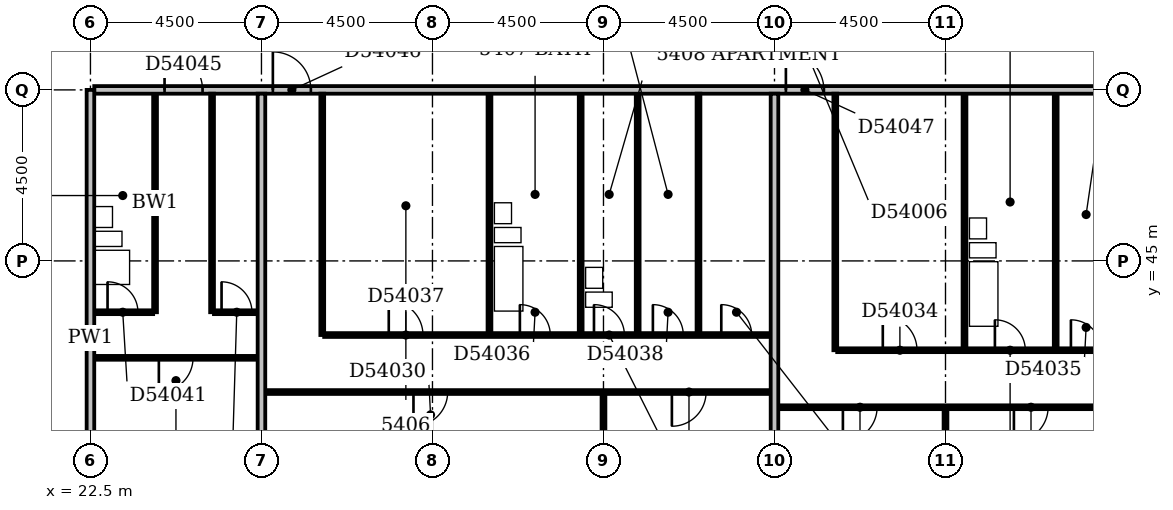
"""IFC4 building model, lengths in metres.
Left out: names, types, materials, properties, quantities, classifications, styles, units other than length and angle.
Written with IfcOpenShell. Run it as: python <this file> out.ifc"""

import sys

from ifc_helpers import new_model, si_unit, direction, frame, frame_2d, origin, place, context, subcontext, project, spatial, rectangle, extrude, element, fill, save


model = new_model("IFC4")
c1 = context("Model", 3, precision=1e-05, world=origin(), true_north=direction((0.0, 1.0)))
c2 = subcontext(c1, "Body", "Model", "MODEL_VIEW")
j1 = project(units=[si_unit("LENGTHUNIT", "METRE"), si_unit("PLANEANGLEUNIT", "RADIAN")], contexts=[c1])
p1 = place(None, origin())
s1 = spatial("IfcSite", under=j1, at=p1, CompositionType="ELEMENT")
p2 = place(p1, origin())
s2 = spatial("IfcBuilding", under=s1, at=p2, CompositionType="ELEMENT")
p3 = place(p2, frame((0.0, 0.0, 211.4)))
s3 = spatial("IfcBuildingStorey", under=s2, at=p3, CompositionType="ELEMENT", Elevation=211.4)
p4 = place(p3, frame((22.5, 36.45, 0.0), z_axis=(0.0, 0.0, 1.0), x_axis=(0.0, 1.0, 0.0)))
e1 = element("IfcWall", 1, at=p4, inside=s3, PredefinedType="PARTITIONING", context=c2, shape_type="SweptSolid", body=[
    extrude(rectangle(XDim=13.05, YDim=0.2, at=frame_2d((6.525, 0.0))), origin(), (0.0, 0.0, 1.0), 3.3),
])
p5 = place(p3, frame((27.0, 36.45, 0.0), z_axis=(0.0, 0.0, 1.0), x_axis=(0.0, 1.0, 0.0)))
e2 = element("IfcWall", 2, at=p5, inside=s3, PredefinedType="PARTITIONING", context=c2, shape_type="SweptSolid", body=[
    extrude(rectangle(XDim=12.95, YDim=0.2, at=frame_2d((6.475, 0.0))), origin(), (0.0, 0.0, 1.0), 2.4),
])
p6 = place(p3, frame((36.0, 36.45, 0.0), z_axis=(0.0, 0.0, 1.0), x_axis=(0.0, 1.0, 0.0)))
e3 = element("IfcWall", 3, at=p6, inside=s3, PredefinedType="PARTITIONING", context=c2, shape_type="SweptSolid", body=[
    extrude(rectangle(XDim=5.05, YDim=0.1, at=frame_2d((2.525, 0.0))), origin(), (0.0, 0.0, 1.0), 2.4),
])
p7 = place(p3, frame((40.5, 36.45, 0.0), z_axis=(0.0, 0.0, 1.0), x_axis=(0.0, 1.0, 0.0)))
e4 = element("IfcWall", 4, at=p7, inside=s3, PredefinedType="PARTITIONING", context=c2, shape_type="SweptSolid", body=[
    extrude(rectangle(XDim=12.95, YDim=0.2, at=frame_2d((6.475, 0.0))), origin(), (0.0, 0.0, 1.0), 3.3),
])
p8 = place(p3, frame((45.0, 36.45, 0.0), z_axis=(0.0, 0.0, 1.0), x_axis=(0.0, 1.0, 0.0)))
e5 = element("IfcWall", 5, at=p8, inside=s3, PredefinedType="PARTITIONING", context=c2, shape_type="SweptSolid", body=[
    extrude(rectangle(XDim=4.65, YDim=0.1, at=frame_2d((2.325, 0.0))), origin(), (0.0, 0.0, 1.0), 2.6),
])
p9 = place(p3, frame((40.6, 41.15, 0.0), z_axis=(0.0, 0.0, 1.0), x_axis=(1.0, 0.0, 0.0)))
e6 = element("IfcWall", 6, at=p9, inside=s3, PredefinedType="PARTITIONING", context=c2, shape_type="SweptSolid", body=[
    extrude(rectangle(XDim=8.8, YDim=0.1, at=frame_2d((4.4, 0.0))), origin(), (0.0, 0.0, 1.0), 3.3),
])
p10 = place(p9, frame((1.7, 0.0, 0.0)))
e7 = element("IfcOpeningElement", 7, at=p10, cuts=e6, PredefinedType="OPENING", context=c2, shape_type="SweptSolid", body=[
    extrude(rectangle(XDim=0.9, YDim=2.1, at=frame_2d((0.45, 1.05))), frame((0.0, 0.062, 0.0), z_axis=(0.0, -1.0, 0.0), x_axis=(1.0, 0.0, 0.0)), (0.0, 0.0, 1.0), 0.124),
])
p11 = place(p9, frame((6.2, 0.0, 0.0)))
e8 = element("IfcOpeningElement", 8, at=p11, cuts=e6, PredefinedType="OPENING", context=c2, shape_type="SweptSolid", body=[
    extrude(rectangle(XDim=0.9, YDim=2.1, at=frame_2d((0.45, 1.05))), frame((0.0, 0.062, 0.0), z_axis=(0.0, -1.0, 0.0), x_axis=(1.0, 0.0, 0.0)), (0.0, 0.0, 1.0), 0.124),
])
p12 = place(p3, frame((27.1, 41.55, 0.0), z_axis=(0.0, 0.0, 1.0), x_axis=(1.0, 0.0, 0.0)))
e9 = element("IfcWall", 9, at=p12, inside=s3, PredefinedType="PARTITIONING", context=c2, shape_type="SweptSolid", body=[
    extrude(rectangle(XDim=13.3, YDim=0.1, at=frame_2d((6.65, 0.0))), origin(), (0.0, 0.0, 1.0), 3.3),
])
p13 = place(p12, frame((3.9, 0.0, 0.0)))
e10 = element("IfcOpeningElement", 10, at=p13, cuts=e9, PredefinedType="OPENING", context=c2, shape_type="SweptSolid", body=[
    extrude(rectangle(XDim=0.9, YDim=2.1, at=frame_2d((0.45, 1.05))), frame((0.0, 0.062, 0.0), z_axis=(0.0, -1.0, 0.0), x_axis=(1.0, 0.0, 0.0)), (0.0, 0.0, 1.0), 0.124),
])
p14 = place(p12, frame((10.7, 0.0, 0.0)))
e11 = element("IfcOpeningElement", 11, at=p14, cuts=e9, PredefinedType="OPENING", context=c2, shape_type="SweptSolid", body=[
    extrude(rectangle(XDim=0.9, YDim=2.1, at=frame_2d((0.45, 1.05))), frame((0.0, 0.062, 0.0), z_axis=(0.0, -1.0, 0.0), x_axis=(1.0, 0.0, 0.0)), (0.0, 0.0, 1.0), 0.124),
])
p15 = place(p3, frame((22.6, 42.45, 0.0), z_axis=(0.0, 0.0, 1.0), x_axis=(1.0, 0.0, 0.0)))
e12 = element("IfcWall", 12, at=p15, inside=s3, PredefinedType="PARTITIONING", context=c2, shape_type="SweptSolid", body=[
    extrude(rectangle(XDim=4.3, YDim=0.1, at=frame_2d((2.15, 0.0))), origin(), (0.0, 0.0, 1.0), 3.3),
])
p16 = place(p15, frame((1.7, 0.0, 0.0)))
e13 = element("IfcOpeningElement", 13, at=p16, cuts=e12, PredefinedType="OPENING", context=c2, shape_type="SweptSolid", body=[
    extrude(rectangle(XDim=0.9, YDim=2.1, at=frame_2d((0.45, 1.05))), frame((0.0, 0.062, 0.0), z_axis=(0.0, -1.0, 0.0), x_axis=(1.0, 0.0, 0.0)), (0.0, 0.0, 1.0), 0.124),
])
p17 = place(p3, frame((42.1, 42.65, 0.0), z_axis=(0.0, 0.0, 1.0), x_axis=(0.0, 1.0, 0.0)))
e14 = element("IfcWall", 14, at=p17, inside=s3, PredefinedType="PARTITIONING", context=c2, shape_type="SweptSolid", body=[
    extrude(rectangle(XDim=6.75, YDim=0.1, at=frame_2d((3.375, 0.0))), origin(), (0.0, 0.0, 1.0), 3.3),
])
p18 = place(p3, frame((42.15, 42.65, 0.0), z_axis=(0.0, 0.0, 1.0), x_axis=(1.0, 0.0, 0.0)))
e15 = element("IfcWall", 15, at=p18, inside=s3, PredefinedType="PARTITIONING", context=c2, shape_type="SweptSolid", body=[
    extrude(rectangle(XDim=7.25, YDim=0.1, at=frame_2d((3.625, 0.0))), origin(), (0.0, 0.0, 1.0), 3.3),
])
p19 = place(p18, frame((4.15, 0.0, 0.0)))
e16 = element("IfcOpeningElement", 16, at=p19, cuts=e15, PredefinedType="OPENING", context=c2, shape_type="SweptSolid", body=[
    extrude(rectangle(XDim=0.8, YDim=2.1, at=frame_2d((0.4, 1.05))), frame((0.0, 0.062, 0.0), z_axis=(0.0, -1.0, 0.0), x_axis=(1.0, 0.0, 0.0)), (0.0, 0.0, 1.0), 0.124),
])
p20 = place(p18, frame((1.2, 0.0, 0.0)))
e17 = element("IfcOpeningElement", 17, at=p20, cuts=e15, PredefinedType="OPENING", context=c2, shape_type="SweptSolid", body=[
    extrude(rectangle(XDim=0.9, YDim=2.1, at=frame_2d((0.45, 1.05))), frame((0.0, 0.062, 0.0), z_axis=(0.0, -1.0, 0.0), x_axis=(1.0, 0.0, 0.0)), (0.0, 0.0, 1.0), 0.124),
])
p21 = place(p18, frame((6.15, 0.0, 0.0)))
e18 = element("IfcOpeningElement", 18, at=p21, cuts=e15, PredefinedType="OPENING", context=c2, shape_type="SweptSolid", body=[
    extrude(rectangle(XDim=0.8, YDim=2.1, at=frame_2d((0.4, 1.05))), frame((0.0, 0.062, 0.0), z_axis=(0.0, -1.0, 0.0), x_axis=(1.0, 0.0, 0.0)), (0.0, 0.0, 1.0), 0.124),
])
p22 = place(p3, frame((45.5, 42.7, 0.0), z_axis=(0.0, 0.0, 1.0), x_axis=(0.0, 1.0, 0.0)))
e19 = element("IfcWall", 19, at=p22, inside=s3, PredefinedType="PLUMBINGWALL", context=c2, shape_type="SweptSolid", body=[
    extrude(rectangle(XDim=6.7, YDim=0.1, at=frame_2d((3.35, 0.0))), origin(), (0.0, 0.0, 1.0), 2.6),
])
p23 = place(p3, frame((47.9, 42.7, 0.0), z_axis=(0.0, 0.0, 1.0), x_axis=(0.0, 1.0, 0.0)))
e20 = element("IfcWall", 20, at=p23, inside=s3, PredefinedType="PLUMBINGWALL", context=c2, shape_type="SweptSolid", body=[
    extrude(rectangle(XDim=6.7, YDim=0.1, at=frame_2d((3.35, 0.0))), origin(), (0.0, 0.0, 1.0), 3.3),
])
p24 = place(p3, frame((28.6, 43.05, 0.0), z_axis=(0.0, 0.0, 1.0), x_axis=(0.0, 1.0, 0.0)))
e21 = element("IfcWall", 21, at=p24, inside=s3, PredefinedType="PARTITIONING", context=c2, shape_type="SweptSolid", body=[
    extrude(rectangle(XDim=6.35, YDim=0.1, at=frame_2d((3.175, 0.0))), origin(), (0.0, 0.0, 1.0), 3.3),
])
p25 = place(p3, frame((28.65, 43.05, 0.0), z_axis=(0.0, 0.0, 1.0), x_axis=(1.0, 0.0, 0.0)))
e22 = element("IfcWall", 22, at=p25, inside=s3, PredefinedType="PARTITIONING", context=c2, shape_type="SweptSolid", body=[
    extrude(rectangle(XDim=11.75, YDim=0.1, at=frame_2d((5.875, 0.0))), origin(), (0.0, 0.0, 1.0), 3.3),
])
p26 = place(p25, frame((5.15, 0.0, 0.0)))
e23 = element("IfcOpeningElement", 23, at=p26, cuts=e22, PredefinedType="OPENING", context=c2, shape_type="SweptSolid", body=[
    extrude(rectangle(XDim=0.8, YDim=2.1, at=frame_2d((0.4, 1.05))), frame((0.0, 0.062, 0.0), z_axis=(0.0, -1.0, 0.0), x_axis=(1.0, 0.0, 0.0)), (0.0, 0.0, 1.0), 0.124),
])
p27 = place(p25, frame((1.7, 0.0, 0.0)))
e24 = element("IfcOpeningElement", 24, at=p27, cuts=e22, PredefinedType="OPENING", context=c2, shape_type="SweptSolid", body=[
    extrude(rectangle(XDim=0.9, YDim=2.1, at=frame_2d((0.45, 1.05))), frame((0.0, 0.062, 0.0), z_axis=(0.0, -1.0, 0.0), x_axis=(1.0, 0.0, 0.0)), (0.0, 0.0, 1.0), 0.124),
])
p28 = place(p25, frame((8.65, 0.0, 0.0)))
e25 = element("IfcOpeningElement", 25, at=p28, cuts=e22, PredefinedType="OPENING", context=c2, shape_type="SweptSolid", body=[
    extrude(rectangle(XDim=0.8, YDim=2.1, at=frame_2d((0.4, 1.05))), frame((0.0, 0.062, 0.0), z_axis=(0.0, -1.0, 0.0), x_axis=(1.0, 0.0, 0.0)), (0.0, 0.0, 1.0), 0.124),
])
p29 = place(p25, frame((10.45, 0.0, 0.0)))
e26 = element("IfcOpeningElement", 26, at=p29, cuts=e22, PredefinedType="OPENING", context=c2, shape_type="SweptSolid", body=[
    extrude(rectangle(XDim=0.8, YDim=2.1, at=frame_2d((0.4, 1.05))), frame((0.0, 0.062, 0.0), z_axis=(0.0, -1.0, 0.0), x_axis=(1.0, 0.0, 0.0)), (0.0, 0.0, 1.0), 0.124),
])
p30 = place(p25, frame((7.1, 0.0, 0.0)))
e27 = element("IfcOpeningElement", 27, at=p30, cuts=e22, PredefinedType="OPENING", context=c2, shape_type="SweptSolid", body=[
    extrude(rectangle(XDim=0.8, YDim=2.1, at=frame_2d((0.4, 1.05))), frame((0.0, 0.062, 0.0), z_axis=(0.0, -1.0, 0.0), x_axis=(1.0, 0.0, 0.0)), (0.0, 0.0, 1.0), 0.124),
])
p31 = place(p3, frame((33.0, 43.1, 0.0), z_axis=(0.0, 0.0, 1.0), x_axis=(0.0, 1.0, 0.0)))
e28 = element("IfcWall", 28, at=p31, inside=s3, PredefinedType="PLUMBINGWALL", context=c2, shape_type="SweptSolid", body=[
    extrude(rectangle(XDim=6.3, YDim=0.1, at=frame_2d((3.15, 0.0))), origin(), (0.0, 0.0, 1.0), 3.3),
])
p32 = place(p3, frame((35.4, 43.1, 0.0), z_axis=(0.0, 0.0, 1.0), x_axis=(0.0, 1.0, 0.0)))
e29 = element("IfcWall", 29, at=p32, inside=s3, PredefinedType="PLUMBINGWALL", context=c2, shape_type="SweptSolid", body=[
    extrude(rectangle(XDim=6.3, YDim=0.1, at=frame_2d((3.15, 0.0))), origin(), (0.0, 0.0, 1.0), 2.4),
])
p33 = place(p3, frame((36.9, 43.1, 0.0), z_axis=(0.0, 0.0, 1.0), x_axis=(0.0, 1.0, 0.0)))
e30 = element("IfcWall", 30, at=p33, inside=s3, PredefinedType="PLUMBINGWALL", context=c2, shape_type="SweptSolid", body=[
    extrude(rectangle(XDim=6.3, YDim=0.1, at=frame_2d((3.15, 0.0))), origin(), (0.0, 0.0, 1.0), 3.3),
])
p34 = place(p3, frame((38.5, 43.1, 0.0), z_axis=(0.0, 0.0, 1.0), x_axis=(0.0, 1.0, 0.0)))
e31 = element("IfcWall", 31, at=p34, inside=s3, PredefinedType="PARTITIONING", context=c2, shape_type="SweptSolid", body=[
    extrude(rectangle(XDim=6.3, YDim=0.1, at=frame_2d((3.15, 0.0))), origin(), (0.0, 0.0, 1.0), 3.3),
])
p35 = place(p3, frame((22.6, 43.65, 0.0), z_axis=(0.0, 0.0, 1.0), x_axis=(1.0, 0.0, 0.0)))
e32 = element("IfcWall", 32, at=p35, inside=s3, PredefinedType="PARTITIONING", context=c2, shape_type="SweptSolid", body=[
    extrude(rectangle(XDim=1.55, YDim=0.1, at=frame_2d((0.775, 0.0))), origin(), (0.0, 0.0, 1.0), 3.3),
])
p36 = place(p35, frame((0.35, 0.0, 0.0)))
e33 = element("IfcOpeningElement", 33, at=p36, cuts=e32, PredefinedType="OPENING", context=c2, shape_type="SweptSolid", body=[
    extrude(rectangle(XDim=0.8, YDim=2.1, at=frame_2d((0.4, 1.05))), frame((0.0, 0.062, 0.0), z_axis=(0.0, -1.0, 0.0), x_axis=(1.0, 0.0, 0.0)), (0.0, 0.0, 1.0), 0.124),
])
p37 = place(p3, frame((24.2, 43.65, 0.0), z_axis=(0.0, 0.0, 1.0), x_axis=(0.0, 1.0, 0.0)))
e34 = element("IfcWall", 34, at=p37, inside=s3, PredefinedType="PLUMBINGWALL", context=c2, shape_type="SweptSolid", body=[
    extrude(rectangle(XDim=5.75, YDim=0.1, at=frame_2d((2.875, 0.0))), origin(), (0.0, 0.0, 1.0), 3.3),
])
p38 = place(p3, frame((25.7, 43.65, 0.0), z_axis=(0.0, 0.0, 1.0), x_axis=(0.0, 1.0, 0.0)))
e35 = element("IfcWall", 35, at=p38, inside=s3, PredefinedType="PARTITIONING", context=c2, shape_type="SweptSolid", body=[
    extrude(rectangle(XDim=5.75, YDim=0.1, at=frame_2d((2.875, 0.0))), origin(), (0.0, 0.0, 1.0), 3.3),
])
p39 = place(p3, frame((25.75, 43.65, 0.0), z_axis=(0.0, 0.0, 1.0), x_axis=(1.0, 0.0, 0.0)))
e36 = element("IfcWall", 36, at=p39, inside=s3, PredefinedType="PARTITIONING", context=c2, shape_type="SweptSolid", body=[
    extrude(rectangle(XDim=1.15, YDim=0.1, at=frame_2d((0.575, 0.0))), origin(), (0.0, 0.0, 1.0), 3.3),
])
p40 = place(p39, frame((0.2, 0.0, 0.0)))
e37 = element("IfcOpeningElement", 37, at=p40, cuts=e36, PredefinedType="OPENING", context=c2, shape_type="SweptSolid", body=[
    extrude(rectangle(XDim=0.8, YDim=2.1, at=frame_2d((0.4, 1.05))), frame((0.0, 0.062, 0.0), z_axis=(0.0, -1.0, 0.0), x_axis=(1.0, 0.0, 0.0)), (0.0, 0.0, 1.0), 0.124),
])
p41 = place(p3, frame((22.6, 49.5, 0.0), z_axis=(0.0, 0.0, 1.0), x_axis=(1.0, 0.0, 0.0)))
e38 = element("IfcWall", 38, at=p41, inside=s3, PredefinedType="PARTITIONING", context=c2, shape_type="SweptSolid", body=[
    extrude(rectangle(XDim=30.95, YDim=0.2, at=frame_2d((15.475, 0.0))), origin(), (0.0, 0.0, 1.0), 3.3),
])
p42 = place(p41, frame((1.85, 0.0, 0.0)))
e39 = element("IfcOpeningElement", 39, at=p42, cuts=e38, PredefinedType="OPENING", context=c2, shape_type="SweptSolid", body=[
    extrude(rectangle(XDim=1.0, YDim=2.1, at=frame_2d((0.5, 1.05))), frame((0.0, 0.112, 0.0), z_axis=(0.0, -1.0, 0.0), x_axis=(1.0, 0.0, 0.0)), (0.0, 0.0, 1.0), 0.224),
])
p43 = place(p41, frame((4.7, 0.0, 0.0)))
e40 = element("IfcOpeningElement", 40, at=p43, cuts=e38, PredefinedType="OPENING", context=c2, shape_type="SweptSolid", body=[
    extrude(rectangle(XDim=1.0, YDim=2.1, at=frame_2d((0.5, 1.05))), frame((0.0, 0.112, 0.0), z_axis=(0.0, -1.0, 0.0), x_axis=(1.0, 0.0, 0.0)), (0.0, 0.0, 1.0), 0.224),
])
p44 = place(p41, frame((18.2, 0.0, 0.0)))
e41 = element("IfcOpeningElement", 41, at=p44, cuts=e38, PredefinedType="OPENING", context=c2, shape_type="SweptSolid", body=[
    extrude(rectangle(XDim=1.0, YDim=2.1, at=frame_2d((0.5, 1.05))), frame((0.0, 0.112, 0.0), z_axis=(0.0, -1.0, 0.0), x_axis=(1.0, 0.0, 0.0)), (0.0, 0.0, 1.0), 0.224),
])
p45 = place(p41, frame((27.15, 0.0, 0.0)))
e42 = element("IfcOpeningElement", 42, at=p45, cuts=e38, PredefinedType="OPENING", context=c2, shape_type="SweptSolid", body=[
    extrude(rectangle(XDim=1.0, YDim=2.1, at=frame_2d((0.5, 1.05))), frame((0.0, 0.112, 0.0), z_axis=(0.0, -1.0, 0.0), x_axis=(1.0, 0.0, 0.0)), (0.0, 0.0, 1.0), 0.224),
])
p46 = place(p10, frame((0.9, 0.0, 0.0), z_axis=(0.0, 0.0, 1.0), x_axis=(-1.0, 0.0, 0.0)))
e43 = element("IfcDoor", 43, at=p46, inside=s3, OperationType="SINGLE_SWING_RIGHT", PredefinedType="DOOR", context=c2, shape_type="SweptSolid", body=[
    extrude(rectangle(XDim=0.9, YDim=2.1, at=frame_2d((0.45, 1.05))), frame((0.0, 0.025, 0.0), z_axis=(0.0, -1.0, 0.0), x_axis=(1.0, 0.0, 0.0)), (0.0, 0.0, 1.0), 0.05),
])
fill(e7, e43)
p47 = place(p11, frame((0.9, 0.0, 0.0), z_axis=(0.0, 0.0, 1.0), x_axis=(-1.0, 0.0, 0.0)))
e44 = element("IfcDoor", 44, at=p47, inside=s3, OperationType="SINGLE_SWING_RIGHT", PredefinedType="DOOR", context=c2, shape_type="SweptSolid", body=[
    extrude(rectangle(XDim=0.9, YDim=2.1, at=frame_2d((0.45, 1.05))), frame((0.0, 0.025, 0.0), z_axis=(0.0, -1.0, 0.0), x_axis=(1.0, 0.0, 0.0)), (0.0, 0.0, 1.0), 0.05),
])
fill(e8, e44)
p48 = place(p13, frame((0.9, 0.0, 0.0), z_axis=(0.0, 0.0, 1.0), x_axis=(-1.0, 0.0, 0.0)))
e45 = element("IfcDoor", 45, at=p48, inside=s3, OperationType="SINGLE_SWING_RIGHT", PredefinedType="DOOR", context=c2, shape_type="SweptSolid", body=[
    extrude(rectangle(XDim=0.9, YDim=2.1, at=frame_2d((0.45, 1.05))), frame((0.0, 0.025, 0.0), z_axis=(0.0, -1.0, 0.0), x_axis=(1.0, 0.0, 0.0)), (0.0, 0.0, 1.0), 0.05),
])
fill(e10, e45)
p49 = place(p14, frame((0.9, 0.0, 0.0), z_axis=(0.0, 0.0, 1.0), x_axis=(-1.0, 0.0, 0.0)))
e46 = element("IfcDoor", 46, at=p49, inside=s3, OperationType="SINGLE_SWING_RIGHT", PredefinedType="DOOR", context=c2, shape_type="SweptSolid", body=[
    extrude(rectangle(XDim=0.9, YDim=2.1, at=frame_2d((0.45, 1.05))), frame((0.0, 0.025, 0.0), z_axis=(0.0, -1.0, 0.0), x_axis=(1.0, 0.0, 0.0)), (0.0, 0.0, 1.0), 0.05),
])
fill(e11, e46)
p50 = place(p16, frame((0.9, 0.0, 0.0), z_axis=(0.0, 0.0, 1.0), x_axis=(-1.0, 0.0, 0.0)))
e47 = element("IfcDoor", 47, at=p50, inside=s3, OperationType="SINGLE_SWING_RIGHT", PredefinedType="DOOR", context=c2, shape_type="SweptSolid", body=[
    extrude(rectangle(XDim=0.9, YDim=2.1, at=frame_2d((0.45, 1.05))), frame((0.0, 0.025, 0.0), z_axis=(0.0, -1.0, 0.0), x_axis=(1.0, 0.0, 0.0)), (0.0, 0.0, 1.0), 0.05),
])
fill(e13, e47)
p51 = place(p19, origin())
e48 = element("IfcDoor", 48, at=p51, inside=s3, OperationType="SINGLE_SWING_LEFT", PredefinedType="DOOR", context=c2, shape_type="SweptSolid", body=[
    extrude(rectangle(XDim=0.8, YDim=2.1, at=frame_2d((0.4, 1.05))), frame((0.0, 0.025, 0.0), z_axis=(0.0, -1.0, 0.0), x_axis=(1.0, 0.0, 0.0)), (0.0, 0.0, 1.0), 0.05),
])
fill(e16, e48)
p52 = place(p20, origin())
e49 = element("IfcDoor", 49, at=p52, inside=s3, OperationType="SINGLE_SWING_LEFT", PredefinedType="DOOR", context=c2, shape_type="SweptSolid", body=[
    extrude(rectangle(XDim=0.9, YDim=2.1, at=frame_2d((0.45, 1.05))), frame((0.0, 0.025, 0.0), z_axis=(0.0, -1.0, 0.0), x_axis=(1.0, 0.0, 0.0)), (0.0, 0.0, 1.0), 0.05),
])
fill(e17, e49)
p53 = place(p21, origin())
e50 = element("IfcDoor", 50, at=p53, inside=s3, OperationType="SINGLE_SWING_LEFT", PredefinedType="DOOR", context=c2, shape_type="SweptSolid", body=[
    extrude(rectangle(XDim=0.8, YDim=2.1, at=frame_2d((0.4, 1.05))), frame((0.0, 0.025, 0.0), z_axis=(0.0, -1.0, 0.0), x_axis=(1.0, 0.0, 0.0)), (0.0, 0.0, 1.0), 0.05),
])
fill(e18, e50)
p54 = place(p26, origin())
e51 = element("IfcDoor", 51, at=p54, inside=s3, OperationType="SINGLE_SWING_LEFT", PredefinedType="DOOR", context=c2, shape_type="SweptSolid", body=[
    extrude(rectangle(XDim=0.8, YDim=2.1, at=frame_2d((0.4, 1.05))), frame((0.0, 0.025, 0.0), z_axis=(0.0, -1.0, 0.0), x_axis=(1.0, 0.0, 0.0)), (0.0, 0.0, 1.0), 0.05),
])
fill(e23, e51)
p55 = place(p27, origin())
e52 = element("IfcDoor", 52, at=p55, inside=s3, OperationType="SINGLE_SWING_LEFT", PredefinedType="DOOR", context=c2, shape_type="SweptSolid", body=[
    extrude(rectangle(XDim=0.9, YDim=2.1, at=frame_2d((0.45, 1.05))), frame((0.0, 0.025, 0.0), z_axis=(0.0, -1.0, 0.0), x_axis=(1.0, 0.0, 0.0)), (0.0, 0.0, 1.0), 0.05),
])
fill(e24, e52)
p56 = place(p28, origin())
e53 = element("IfcDoor", 53, at=p56, inside=s3, OperationType="SINGLE_SWING_LEFT", PredefinedType="DOOR", context=c2, shape_type="SweptSolid", body=[
    extrude(rectangle(XDim=0.8, YDim=2.1, at=frame_2d((0.4, 1.05))), frame((0.0, 0.025, 0.0), z_axis=(0.0, -1.0, 0.0), x_axis=(1.0, 0.0, 0.0)), (0.0, 0.0, 1.0), 0.05),
])
fill(e25, e53)
p57 = place(p29, origin())
e54 = element("IfcDoor", 54, at=p57, inside=s3, OperationType="SINGLE_SWING_LEFT", PredefinedType="DOOR", context=c2, shape_type="SweptSolid", body=[
    extrude(rectangle(XDim=0.8, YDim=2.1, at=frame_2d((0.4, 1.05))), frame((0.0, 0.025, 0.0), z_axis=(0.0, -1.0, 0.0), x_axis=(1.0, 0.0, 0.0)), (0.0, 0.0, 1.0), 0.05),
])
fill(e26, e54)
p58 = place(p30, origin())
e55 = element("IfcDoor", 55, at=p58, inside=s3, OperationType="SINGLE_SWING_LEFT", PredefinedType="DOOR", context=c2, shape_type="SweptSolid", body=[
    extrude(rectangle(XDim=0.8, YDim=2.1, at=frame_2d((0.4, 1.05))), frame((0.0, 0.025, 0.0), z_axis=(0.0, -1.0, 0.0), x_axis=(1.0, 0.0, 0.0)), (0.0, 0.0, 1.0), 0.05),
])
fill(e27, e55)
p59 = place(p36, origin())
e56 = element("IfcDoor", 56, at=p59, inside=s3, OperationType="SINGLE_SWING_LEFT", PredefinedType="DOOR", context=c2, shape_type="SweptSolid", body=[
    extrude(rectangle(XDim=0.8, YDim=2.1, at=frame_2d((0.4, 1.05))), frame((0.0, 0.025, 0.0), z_axis=(0.0, -1.0, 0.0), x_axis=(1.0, 0.0, 0.0)), (0.0, 0.0, 1.0), 0.05),
])
fill(e33, e56)
p60 = place(p40, origin())
e57 = element("IfcDoor", 57, at=p60, inside=s3, OperationType="SINGLE_SWING_LEFT", PredefinedType="DOOR", context=c2, shape_type="SweptSolid", body=[
    extrude(rectangle(XDim=0.8, YDim=2.1, at=frame_2d((0.4, 1.05))), frame((0.0, 0.025, 0.0), z_axis=(0.0, -1.0, 0.0), x_axis=(1.0, 0.0, 0.0)), (0.0, 0.0, 1.0), 0.05),
])
fill(e37, e57)
p61 = place(p42, origin())
e58 = element("IfcDoor", 58, at=p61, inside=s3, OperationType="SINGLE_SWING_LEFT", PredefinedType="DOOR", context=c2, shape_type="SweptSolid", body=[
    extrude(rectangle(XDim=1.0, YDim=2.1, at=frame_2d((0.5, 1.05))), frame((0.0, 0.025, 0.0), z_axis=(0.0, -1.0, 0.0), x_axis=(1.0, 0.0, 0.0)), (0.0, 0.0, 1.0), 0.05),
])
fill(e39, e58)
p62 = place(p43, origin())
e59 = element("IfcDoor", 59, at=p62, inside=s3, OperationType="SINGLE_SWING_LEFT", PredefinedType="DOOR", context=c2, shape_type="SweptSolid", body=[
    extrude(rectangle(XDim=1.0, YDim=2.1, at=frame_2d((0.5, 1.05))), frame((0.0, 0.025, 0.0), z_axis=(0.0, -1.0, 0.0), x_axis=(1.0, 0.0, 0.0)), (0.0, 0.0, 1.0), 0.05),
])
fill(e40, e59)
p63 = place(p44, origin())
e60 = element("IfcDoor", 60, at=p63, inside=s3, OperationType="SINGLE_SWING_LEFT", PredefinedType="DOOR", context=c2, shape_type="SweptSolid", body=[
    extrude(rectangle(XDim=1.0, YDim=2.1, at=frame_2d((0.5, 1.05))), frame((0.0, 0.025, 0.0), z_axis=(0.0, -1.0, 0.0), x_axis=(1.0, 0.0, 0.0)), (0.0, 0.0, 1.0), 0.05),
])
fill(e41, e60)
save(model, sys.argv[1])
